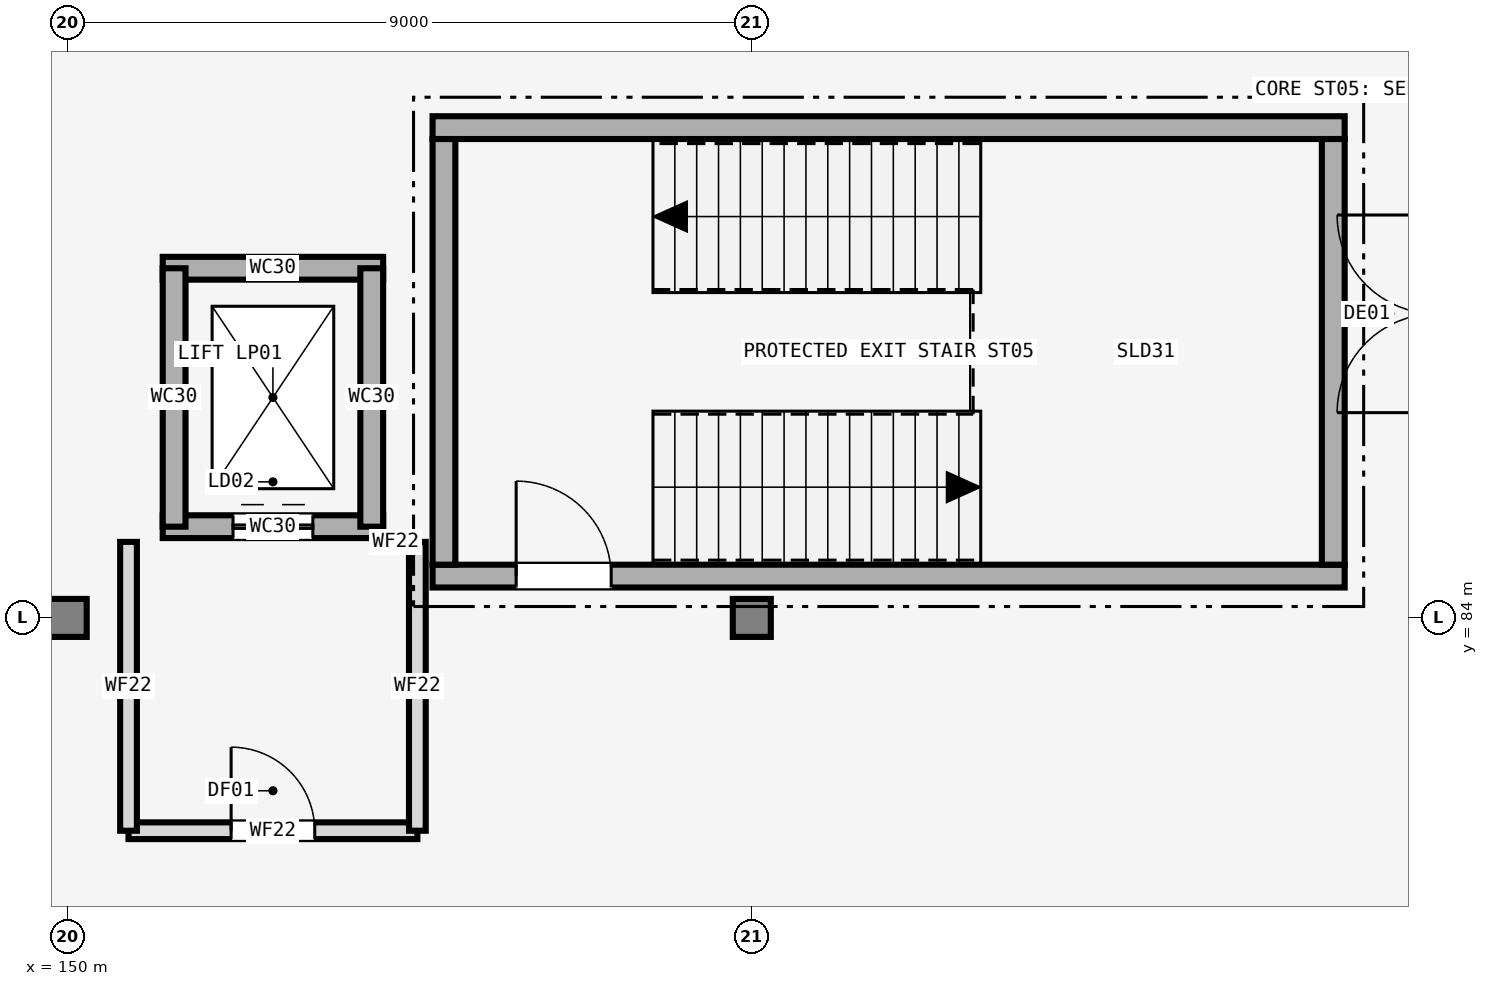
"""IFC4 building model, lengths in metres.
Left out: names, types, materials, properties, quantities, classifications, styles, units other than length and angle.
Written with IfcOpenShell. Run it as: python <this file> out.ifc"""

import sys

from ifc_helpers import new_model, si_unit, direction, frame, frame_2d, origin, origin_2d, place, context, subcontext, project, spatial, rectangle, extrude, element, fill, save


model = new_model("IFC4")
c1 = context("Model", 3, precision=1e-05, world=origin(), true_north=direction((0.0, 1.0)))
c2 = subcontext(c1, "Body", "Model", "MODEL_VIEW")
j1 = project(units=[si_unit("LENGTHUNIT", "METRE"), si_unit("PLANEANGLEUNIT", "RADIAN")], contexts=[c1])
p1 = place(None, origin())
s1 = spatial("IfcSite", under=j1, at=p1, CompositionType="ELEMENT")
p2 = place(p1, origin())
s2 = spatial("IfcBuilding", under=s1, at=p2, CompositionType="ELEMENT")
p3 = place(p2, origin())
s3 = spatial("IfcBuildingStorey", under=s2, at=p3, CompositionType="ELEMENT", Elevation=0.0)
for number, where, z_axis, x_axis in (
    (1, (150.0, 84.0, 0.0), (0.0, 0.0, 1.0), (1.0, 0.0, 0.0)),
    (2, (159.0, 84.0, 0.0), (0.0, 0.0, 1.0), (1.0, 0.0, 0.0)),
):
    element("IfcColumn", number, at=place(p3, frame(where, z_axis=z_axis, x_axis=x_axis)), inside=s3, PredefinedType="COLUMN", context=c2, shape_type="SweptSolid", body=[
        extrude(rectangle(XDim=0.5, YDim=0.5, at=origin_2d()), origin(), (0.0, 0.0, 1.0), 4.8),
    ])
p4 = place(p3, frame((154.8, 84.55, 0.0), z_axis=(0.0, 0.0, 1.0), x_axis=(1.0, 0.0, 0.0)))
e3 = element("IfcWall", 3, at=p4, inside=s3, PredefinedType="SHEAR", context=c2, shape_type="SweptSolid", body=[
    extrude(rectangle(XDim=12.0, YDim=0.3, at=frame_2d((6.0, 0.0))), origin(), (0.0, 0.0, 1.0), 4.8),
])
p5 = place(p4, frame((1.1, 0.0, 0.0)))
e4 = element("IfcOpeningElement", 4, at=p5, cuts=e3, PredefinedType="OPENING", context=c2, shape_type="SweptSolid", body=[
    extrude(rectangle(XDim=1.25, YDim=2.15, at=frame_2d((0.625, 1.075))), frame((0.0, 0.16, 0.0), z_axis=(0.0, -1.0, 0.0), x_axis=(1.0, 0.0, 0.0)), (0.0, 0.0, 1.0), 0.32),
])
p6 = place(p3, frame((166.8, 90.45, 0.0), z_axis=(0.0, 0.0, 1.0), x_axis=(-1.0, 0.0, 0.0)))
e5 = element("IfcWall", 5, at=p6, inside=s3, PredefinedType="SHEAR", context=c2, shape_type="SweptSolid", body=[
    extrude(rectangle(XDim=12.0, YDim=0.3, at=frame_2d((6.0, 0.0))), origin(), (0.0, 0.0, 1.0), 4.8),
])
for number, where, z_axis, x_axis in (
    (6, (154.95, 90.3, 0.0), (0.0, 0.0, 1.0), (0.0, -1.0, 0.0)),
    (7, (166.65, 84.7, 0.0), (0.0, 0.0, 1.0), (0.0, 1.0, 0.0)),
):
    element("IfcWall", number, at=place(p3, frame(where, z_axis=z_axis, x_axis=x_axis)), inside=s3, PredefinedType="SHEAR", context=c2, shape_type="SweptSolid", body=[
        extrude(rectangle(XDim=5.6, YDim=0.3, at=frame_2d((2.8, 0.0))), origin(), (0.0, 0.0, 1.0), 4.8),
    ])
p7 = place(p3, frame((151.25, 85.2, 0.0), z_axis=(0.0, 0.0, 1.0), x_axis=(1.0, 0.0, 0.0)))
e8 = element("IfcWall", 8, at=p7, inside=s3, PredefinedType="SHEAR", context=c2, shape_type="SweptSolid", body=[
    extrude(rectangle(XDim=2.9, YDim=0.3, at=frame_2d((1.45, 0.0))), origin(), (0.0, 0.0, 1.0), 4.8),
])
p8 = place(p7, frame((0.925, 0.0, 0.0)))
e9 = element("IfcOpeningElement", 9, at=p8, cuts=e8, PredefinedType="OPENING", context=c2, shape_type="SweptSolid", body=[
    extrude(rectangle(XDim=1.05, YDim=2.15, at=frame_2d((0.525, 1.075))), frame((0.0, 0.16, 0.0), z_axis=(0.0, -1.0, 0.0), x_axis=(1.0, 0.0, 0.0)), (0.0, 0.0, 1.0), 0.32),
])
p9 = place(p3, frame((154.15, 88.6, 0.0), z_axis=(0.0, 0.0, 1.0), x_axis=(-1.0, 0.0, 0.0)))
e10 = element("IfcWall", 10, at=p9, inside=s3, PredefinedType="SHEAR", context=c2, shape_type="SweptSolid", body=[
    extrude(rectangle(XDim=2.9, YDim=0.3, at=frame_2d((1.45, 0.0))), origin(), (0.0, 0.0, 1.0), 4.8),
])
for number, where, z_axis, x_axis in (
    (11, (151.4, 88.6, 0.0), (0.0, 0.0, 1.0), (0.0, -1.0, 0.0)),
    (12, (154.0, 85.2, 0.0), (0.0, 0.0, 1.0), (0.0, 1.0, 0.0)),
):
    element("IfcWall", number, at=place(p3, frame(where, z_axis=z_axis, x_axis=x_axis)), inside=s3, PredefinedType="SHEAR", context=c2, shape_type="SweptSolid", body=[
        extrude(rectangle(XDim=3.4, YDim=0.3, at=frame_2d((1.7, 0.0))), origin(), (0.0, 0.0, 1.0), 4.8),
    ])
p10 = place(p3, frame((150.8, 81.2, 0.0), z_axis=(0.0, 0.0, 1.0), x_axis=(1.0, 0.0, 0.0)))
e13 = element("IfcWall", 13, at=p10, inside=s3, PredefinedType="SOLIDWALL", context=c2, shape_type="SweptSolid", body=[
    extrude(rectangle(XDim=3.8, YDim=0.22, at=frame_2d((1.9, 0.0))), origin(), (0.0, 0.0, 1.0), 3.68),
])
p11 = place(p10, frame((1.35, 0.0, 0.0)))
e14 = element("IfcOpeningElement", 14, at=p11, cuts=e13, PredefinedType="OPENING", context=c2, shape_type="SweptSolid", body=[
    extrude(rectangle(XDim=1.1, YDim=2.15, at=frame_2d((0.55, 1.075))), frame((0.0, 0.12, 0.0), z_axis=(0.0, -1.0, 0.0), x_axis=(1.0, 0.0, 0.0)), (0.0, 0.0, 1.0), 0.24),
])
for number, where, z_axis, x_axis in (
    (15, (150.8, 81.2, 0.0), (0.0, 0.0, 1.0), (0.0, 1.0, 0.0)),
    (16, (154.6, 81.2, 0.0), (0.0, 0.0, 1.0), (0.0, 1.0, 0.0)),
):
    element("IfcWall", number, at=place(p3, frame(where, z_axis=z_axis, x_axis=x_axis)), inside=s3, PredefinedType="SOLIDWALL", context=c2, shape_type="SweptSolid", body=[
        extrude(rectangle(XDim=3.8, YDim=0.22, at=frame_2d((1.9, 0.0))), origin(), (0.0, 0.0, 1.0), 3.68),
    ])
p12 = place(p3, frame((154.15, 85.0, 0.0), z_axis=(0.0, 0.0, 1.0), x_axis=(1.0, 0.0, 0.0)))
e17 = element("IfcWall", 17, at=p12, inside=s3, PredefinedType="SOLIDWALL", context=c2, shape_type="SweptSolid", body=[
    extrude(rectangle(XDim=0.33, YDim=0.22, at=frame_2d((0.165, 0.0))), origin(), (0.0, 0.0, 1.0), 3.68),
])
p13 = place(p5, origin())
e18 = element("IfcDoor", 18, at=p13, inside=s3, OperationType="SINGLE_SWING_LEFT", PredefinedType="DOOR", context=c2, shape_type="SweptSolid", body=[
    extrude(rectangle(XDim=1.25, YDim=2.15, at=frame_2d((0.625, 1.075))), frame((0.0, 0.025, 0.0), z_axis=(0.0, -1.0, 0.0), x_axis=(1.0, 0.0, 0.0)), (0.0, 0.0, 1.0), 0.05),
])
fill(e4, e18)
p14 = place(p8, origin())
e19 = element("IfcDoor", 19, at=p14, inside=s3, OperationType="DOUBLE_DOOR_SLIDING", PredefinedType="DOOR", context=c2, shape_type="SweptSolid", body=[
    extrude(rectangle(XDim=1.05, YDim=2.15, at=frame_2d((0.525, 1.075))), frame((0.0, 0.025, 0.0), z_axis=(0.0, -1.0, 0.0), x_axis=(1.0, 0.0, 0.0)), (0.0, 0.0, 1.0), 0.05),
])
fill(e9, e19)
p15 = place(p11, origin())
e20 = element("IfcDoor", 20, at=p15, inside=s3, OperationType="SINGLE_SWING_LEFT", PredefinedType="DOOR", context=c2, shape_type="SweptSolid", body=[
    extrude(rectangle(XDim=1.1, YDim=2.15, at=frame_2d((0.55, 1.075))), frame((0.0, 0.025, 0.0), z_axis=(0.0, -1.0, 0.0), x_axis=(1.0, 0.0, 0.0)), (0.0, 0.0, 1.0), 0.05),
])
fill(e14, e20)
save(model, sys.argv[1])
